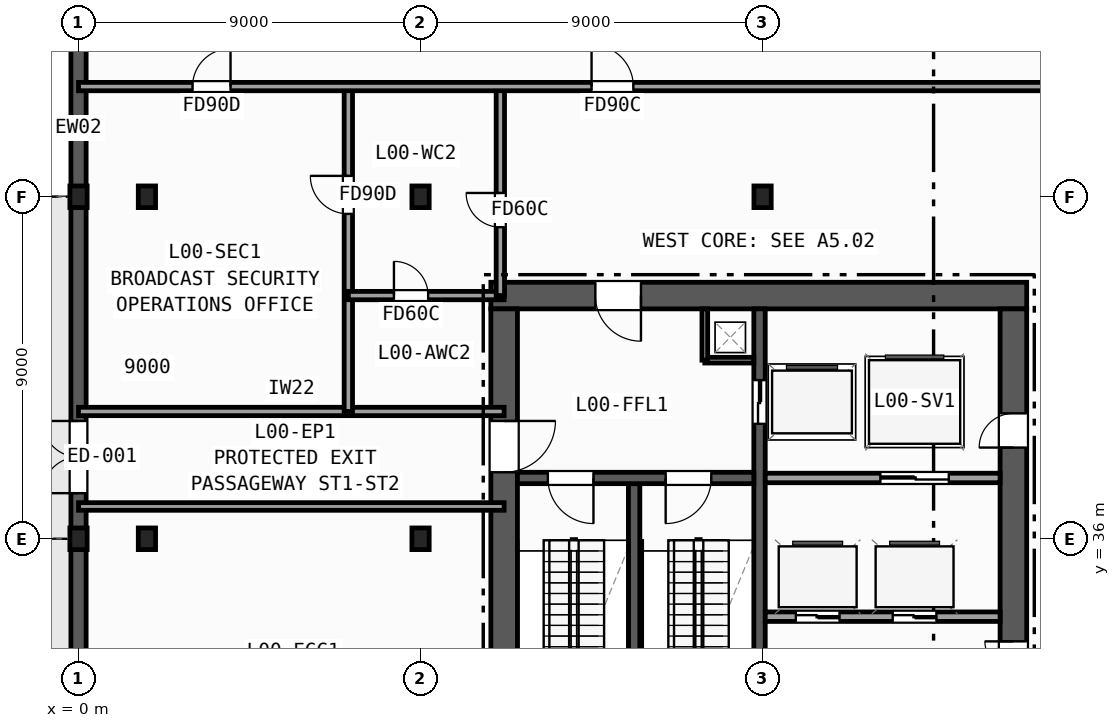
"""IFC4 building model, lengths in metres.
Left out: names, types, materials, properties, quantities, classifications, styles, units other than length and angle.
Written with IfcOpenShell. Run it as: python <this file> out.ifc"""

import sys

from ifc_helpers import new_model, si_unit, direction, frame, frame_2d, origin, origin_2d, place, context, subcontext, project, spatial, rectangle, i_section, extrude, element, fill, save


model = new_model("IFC4")
c1 = context("Model", 3, precision=1e-05, world=origin(), true_north=direction((0.0, 1.0)))
c2 = subcontext(c1, "Body", "Model", "MODEL_VIEW")
j1 = project(units=[si_unit("LENGTHUNIT", "METRE"), si_unit("PLANEANGLEUNIT", "RADIAN")], contexts=[c1])
p1 = place(None, origin())
s1 = spatial("IfcSite", under=j1, at=p1, CompositionType="ELEMENT")
p2 = place(p1, origin())
s2 = spatial("IfcBuilding", under=s1, at=p2, CompositionType="ELEMENT")
p3 = place(p2, origin())
s3 = spatial("IfcBuildingStorey", under=s2, at=p3, CompositionType="ELEMENT", Elevation=0.0)
for number, where, z_axis, x_axis in (
    (1, (0.0, 36.0, 0.0), (0.0, 0.0, 1.0), (1.0, 0.0, 0.0)),
    (2, (0.0, 45.0, 0.0), (0.0, 0.0, 1.0), (1.0, 0.0, 0.0)),
    (3, (9.0, 36.0, 0.0), (0.0, 0.0, 1.0), (1.0, 0.0, 0.0)),
    (4, (9.0, 45.0, 0.0), (0.0, 0.0, 1.0), (1.0, 0.0, 0.0)),
    (5, (18.0, 45.0, 0.0), (0.0, 0.0, 1.0), (1.0, 0.0, 0.0)),
    (6, (1.8, 36.0, 0.0), (0.0, 0.0, 1.0), (1.0, 0.0, 0.0)),
    (7, (1.8, 45.0, 0.0), (0.0, 0.0, 1.0), (1.0, 0.0, 0.0)),
):
    element("IfcColumn", number, at=place(p3, frame(where, z_axis=z_axis, x_axis=x_axis)), inside=s3, PredefinedType="COLUMN", context=c2, shape_type="SweptSolid", body=[
        extrude(i_section(OverallWidth=0.454, OverallDepth=0.569, WebThickness=0.078, FlangeThickness=0.125, FilletRadius=0.015, at=origin_2d()), origin(), (0.0, 0.0, 1.0), 5.8),
    ])
p4 = place(p3, frame((0.0, -0.2, 0.0), z_axis=(0.0, 0.0, 1.0), x_axis=(0.0, 1.0, 0.0)))
e8 = element("IfcWall", 8, at=p4, inside=s3, PredefinedType="SOLIDWALL", context=c2, shape_type="SweptSolid", body=[
    extrude(rectangle(XDim=54.4, YDim=0.4, at=frame_2d((27.2, 0.0))), origin(), (0.0, 0.0, 1.0), 5.48),
])
p5 = place(p4, frame((37.4, 0.0, 0.0)))
e9 = element("IfcOpeningElement", 9, at=p5, cuts=e8, PredefinedType="OPENING", context=c2, shape_type="SweptSolid", body=[
    extrude(rectangle(XDim=1.9, YDim=2.2, at=frame_2d((0.95, 1.1))), frame((0.0, 0.21, 0.0), z_axis=(0.0, -1.0, 0.0), x_axis=(1.0, 0.0, 0.0)), (0.0, 0.0, 1.0), 0.42),
])
p6 = place(p4, frame((19.4, 0.0, 0.0)))
e10 = element("IfcOpeningElement", 10, at=p6, cuts=e8, PredefinedType="OPENING", context=c2, shape_type="SweptSolid", body=[
    extrude(rectangle(XDim=1.6, YDim=2.2, at=frame_2d((0.8, 1.1))), frame((0.0, 0.21, 0.0), z_axis=(0.0, -1.0, 0.0), x_axis=(1.0, 0.0, 0.0)), (0.0, 0.0, 1.0), 0.42),
])
p7 = place(p4, frame((3.6, 0.0, 0.0)))
e11 = element("IfcOpeningElement", 11, at=p7, cuts=e8, PredefinedType="OPENING", context=c2, shape_type="SweptSolid", body=[
    extrude(rectangle(XDim=2.1, YDim=2.4, at=frame_2d((1.05, 1.2))), frame((0.0, 0.21, 0.0), z_axis=(0.0, -1.0, 0.0), x_axis=(1.0, 0.0, 0.0)), (0.0, 0.0, 1.0), 0.42),
])
p8 = place(p4, frame((12.6, 0.0, 0.0)))
e12 = element("IfcOpeningElement", 12, at=p8, cuts=e8, PredefinedType="OPENING", context=c2, shape_type="SweptSolid", body=[
    extrude(rectangle(XDim=2.1, YDim=2.4, at=frame_2d((1.05, 1.2))), frame((0.0, 0.21, 0.0), z_axis=(0.0, -1.0, 0.0), x_axis=(1.0, 0.0, 0.0)), (0.0, 0.0, 1.0), 0.42),
])
p9 = place(p4, frame((21.6, 0.0, 0.0)))
e13 = element("IfcOpeningElement", 13, at=p9, cuts=e8, PredefinedType="OPENING", context=c2, shape_type="SweptSolid", body=[
    extrude(rectangle(XDim=2.1, YDim=2.4, at=frame_2d((1.05, 1.2))), frame((0.0, 0.21, 0.0), z_axis=(0.0, -1.0, 0.0), x_axis=(1.0, 0.0, 0.0)), (0.0, 0.0, 1.0), 0.42),
])
p10 = place(p4, frame((31.4, 0.0, 0.0)))
e14 = element("IfcOpeningElement", 14, at=p10, cuts=e8, PredefinedType="OPENING", context=c2, shape_type="SweptSolid", body=[
    extrude(rectangle(XDim=1.6, YDim=2.2, at=frame_2d((0.8, 1.1))), frame((0.0, 0.21, 0.0), z_axis=(0.0, -1.0, 0.0), x_axis=(1.0, 0.0, 0.0)), (0.0, 0.0, 1.0), 0.42),
])
p11 = place(p3, frame((24.95, 42.4, 0.0), z_axis=(0.0, 0.0, 1.0), x_axis=(-1.0, 0.0, 0.0)))
e15 = element("IfcWall", 15, at=p11, inside=s3, PredefinedType="SHEAR", context=c2, shape_type="SweptSolid", body=[
    extrude(rectangle(XDim=14.1, YDim=0.7, at=frame_2d((7.05, 0.0))), origin(), (0.0, 0.0, 1.0), 5.48),
])
p12 = place(p11, frame((10.15, 0.0, 0.0)))
e16 = element("IfcOpeningElement", 16, at=p12, cuts=e15, PredefinedType="OPENING", context=c2, shape_type="SweptSolid", body=[
    extrude(rectangle(XDim=1.2, YDim=2.15, at=frame_2d((0.6, 1.075))), frame((0.0, 0.36, 0.0), z_axis=(0.0, -1.0, 0.0), x_axis=(1.0, 0.0, 0.0)), (0.0, 0.0, 1.0), 0.72),
])
p13 = place(p3, frame((11.2, 42.05, 0.0), z_axis=(0.0, 0.0, 1.0), x_axis=(0.0, -1.0, 0.0)))
e17 = element("IfcWall", 17, at=p13, inside=s3, PredefinedType="SHEAR", context=c2, shape_type="SweptSolid", body=[
    extrude(rectangle(XDim=13.5, YDim=0.7, at=frame_2d((6.75, 0.0))), origin(), (0.0, 0.0, 1.0), 5.48),
])
p14 = place(p13, frame((2.95, 0.0, 0.0)))
e18 = element("IfcOpeningElement", 18, at=p14, cuts=e17, PredefinedType="OPENING", context=c2, shape_type="SweptSolid", body=[
    extrude(rectangle(XDim=1.35, YDim=2.15, at=frame_2d((0.675, 1.075))), frame((0.0, 0.36, 0.0), z_axis=(0.0, -1.0, 0.0), x_axis=(1.0, 0.0, 0.0)), (0.0, 0.0, 1.0), 0.72),
])
p15 = place(p3, frame((24.6, 28.55, 0.0), z_axis=(0.0, 0.0, 1.0), x_axis=(0.0, 1.0, 0.0)))
e19 = element("IfcWall", 19, at=p15, inside=s3, PredefinedType="SHEAR", context=c2, shape_type="SweptSolid", body=[
    extrude(rectangle(XDim=13.5, YDim=0.7, at=frame_2d((6.75, 0.0))), origin(), (0.0, 0.0, 1.0), 5.48),
])
p16 = place(p15, frame((3.25, 0.0, 0.0)))
e20 = element("IfcOpeningElement", 20, at=p16, cuts=e19, PredefinedType="OPENING", context=c2, shape_type="SweptSolid", body=[
    extrude(rectangle(XDim=1.5, YDim=2.2, at=frame_2d((0.75, 1.1))), frame((0.0, 0.36, 0.0), z_axis=(0.0, -1.0, 0.0), x_axis=(1.0, 0.0, 0.0)), (0.0, 0.0, 1.0), 0.72),
])
p17 = place(p15, frame((9.85, 0.0, 0.0)))
e21 = element("IfcOpeningElement", 21, at=p17, cuts=e19, PredefinedType="OPENING", context=c2, shape_type="SweptSolid", body=[
    extrude(rectangle(XDim=0.9, YDim=2.1, at=frame_2d((0.45, 1.05))), frame((0.0, 0.36, 0.0), z_axis=(0.0, -1.0, 0.0), x_axis=(1.0, 0.0, 0.0)), (0.0, 0.0, 1.0), 0.72),
])
p18 = place(p3, frame((14.62, 28.55, 0.0), z_axis=(0.0, 0.0, 1.0), x_axis=(0.0, 1.0, 0.0)))
e22 = element("IfcWall", 22, at=p18, inside=s3, PredefinedType="SHEAR", context=c2, shape_type="SweptSolid", body=[
    extrude(rectangle(XDim=8.9, YDim=0.3, at=frame_2d((4.45, 0.0))), origin(), (0.0, 0.0, 1.0), 5.48),
])
p19 = place(p3, frame((17.92, 42.05, 0.0), z_axis=(0.0, 0.0, 1.0), x_axis=(0.0, -1.0, 0.0)))
e23 = element("IfcWall", 23, at=p19, inside=s3, PredefinedType="SHEAR", context=c2, shape_type="SweptSolid", body=[
    extrude(rectangle(XDim=13.5, YDim=0.3, at=frame_2d((6.75, 0.0))), origin(), (0.0, 0.0, 1.0), 5.48),
])
p20 = place(p19, frame((1.875, 0.0, 0.0)))
e24 = element("IfcOpeningElement", 24, at=p20, cuts=e23, PredefinedType="OPENING", context=c2, shape_type="SweptSolid", body=[
    extrude(rectangle(XDim=1.15, YDim=2.15, at=frame_2d((0.575, 1.075))), frame((0.0, 0.16, 0.0), z_axis=(0.0, -1.0, 0.0), x_axis=(1.0, 0.0, 0.0)), (0.0, 0.0, 1.0), 0.32),
])
p21 = place(p3, frame((17.77, 37.6, 0.0), z_axis=(0.0, 0.0, 1.0), x_axis=(-1.0, 0.0, 0.0)))
e25 = element("IfcWall", 25, at=p21, inside=s3, PredefinedType="SHEAR", context=c2, shape_type="SweptSolid", body=[
    extrude(rectangle(XDim=6.22, YDim=0.3, at=frame_2d((3.11, 0.0))), origin(), (0.0, 0.0, 1.0), 5.48),
])
p22 = place(p21, frame((4.22, 0.0, 0.0)))
e26 = element("IfcOpeningElement", 26, at=p22, cuts=e25, PredefinedType="OPENING", context=c2, shape_type="SweptSolid", body=[
    extrude(rectangle(XDim=1.2, YDim=2.15, at=frame_2d((0.6, 1.075))), frame((0.0, 0.16, 0.0), z_axis=(0.0, -1.0, 0.0), x_axis=(1.0, 0.0, 0.0)), (0.0, 0.0, 1.0), 0.32),
])
p23 = place(p21, frame((1.12, 0.0, 0.0)))
e27 = element("IfcOpeningElement", 27, at=p23, cuts=e25, PredefinedType="OPENING", context=c2, shape_type="SweptSolid", body=[
    extrude(rectangle(XDim=1.2, YDim=2.15, at=frame_2d((0.6, 1.075))), frame((0.0, 0.16, 0.0), z_axis=(0.0, -1.0, 0.0), x_axis=(1.0, 0.0, 0.0)), (0.0, 0.0, 1.0), 0.32),
])
p24 = place(p3, frame((16.48, 40.7, 0.0), z_axis=(0.0, 0.0, 1.0), x_axis=(1.0, 0.0, 0.0)))
e28 = element("IfcWall", 28, at=p24, inside=s3, PredefinedType="PARTITIONING", context=c2, shape_type="SweptSolid", body=[
    extrude(rectangle(XDim=1.29, YDim=0.15, at=frame_2d((0.645, 0.0))), origin(), (0.0, 0.0, 1.0), 5.48),
])
p25 = place(p3, frame((16.48, 40.7, 0.0), z_axis=(0.0, 0.0, 1.0), x_axis=(0.0, 1.0, 0.0)))
e29 = element("IfcWall", 29, at=p25, inside=s3, PredefinedType="PARTITIONING", context=c2, shape_type="SweptSolid", body=[
    extrude(rectangle(XDim=1.35, YDim=0.15, at=frame_2d((0.675, 0.0))), origin(), (0.0, 0.0, 1.0), 5.48),
])
p26 = place(p3, frame((18.07, 37.6, 0.0), z_axis=(0.0, 0.0, 1.0), x_axis=(1.0, 0.0, 0.0)))
e30 = element("IfcWall", 30, at=p26, inside=s3, PredefinedType="PARTITIONING", context=c2, shape_type="SweptSolid", body=[
    extrude(rectangle(XDim=6.18, YDim=0.25, at=frame_2d((3.09, 0.0))), origin(), (0.0, 0.0, 1.0), 5.48),
])
p27 = place(p26, frame((3.03, 0.0, 0.0)))
e31 = element("IfcOpeningElement", 31, at=p27, cuts=e30, PredefinedType="OPENING", context=c2, shape_type="SweptSolid", body=[
    extrude(rectangle(XDim=1.8, YDim=2.3, at=frame_2d((0.9, 1.15))), frame((0.0, 0.135, 0.0), z_axis=(0.0, -1.0, 0.0), x_axis=(1.0, 0.0, 0.0)), (0.0, 0.0, 1.0), 0.27),
])
p28 = place(p3, frame((24.25, 33.95, 0.0), z_axis=(0.0, 0.0, 1.0), x_axis=(-1.0, 0.0, 0.0)))
e32 = element("IfcWall", 32, at=p28, inside=s3, PredefinedType="PARTITIONING", context=c2, shape_type="SweptSolid", body=[
    extrude(rectangle(XDim=6.18, YDim=0.25, at=frame_2d((3.09, 0.0))), origin(), (0.0, 0.0, 1.0), 5.48),
])
p29 = place(p28, frame((4.225, 0.0, 0.0)))
e33 = element("IfcOpeningElement", 33, at=p29, cuts=e32, PredefinedType="OPENING", context=c2, shape_type="SweptSolid", body=[
    extrude(rectangle(XDim=1.15, YDim=2.15, at=frame_2d((0.575, 1.075))), frame((0.0, 0.135, 0.0), z_axis=(0.0, -1.0, 0.0), x_axis=(1.0, 0.0, 0.0)), (0.0, 0.0, 1.0), 0.27),
])
p30 = place(p28, frame((1.675, 0.0, 0.0)))
e34 = element("IfcOpeningElement", 34, at=p30, cuts=e32, PredefinedType="OPENING", context=c2, shape_type="SweptSolid", body=[
    extrude(rectangle(XDim=1.15, YDim=2.15, at=frame_2d((0.575, 1.075))), frame((0.0, 0.135, 0.0), z_axis=(0.0, -1.0, 0.0), x_axis=(1.0, 0.0, 0.0)), (0.0, 0.0, 1.0), 0.27),
])
p31 = place(p3, frame((0.0, 36.85, 0.0), z_axis=(0.0, 0.0, 1.0), x_axis=(1.0, 0.0, 0.0)))
e35 = element("IfcWall", 35, at=p31, inside=s3, PredefinedType="PARTITIONING", context=c2, shape_type="SweptSolid", body=[
    extrude(rectangle(XDim=11.2, YDim=0.2, at=frame_2d((5.6, 0.0))), origin(), (0.0, 0.0, 1.0), 4.605),
])
p32 = place(p3, frame((0.0, 39.35, 0.0), z_axis=(0.0, 0.0, 1.0), x_axis=(1.0, 0.0, 0.0)))
e36 = element("IfcWall", 36, at=p32, inside=s3, PredefinedType="PARTITIONING", context=c2, shape_type="SweptSolid", body=[
    extrude(rectangle(XDim=11.2, YDim=0.22, at=frame_2d((5.6, 0.0))), origin(), (0.0, 0.0, 1.0), 4.605),
])
p33 = place(p3, frame((7.1, 39.35, 0.0), z_axis=(0.0, 0.0, 1.0), x_axis=(0.0, 1.0, 0.0)))
e37 = element("IfcWall", 37, at=p33, inside=s3, PredefinedType="PARTITIONING", context=c2, shape_type="SweptSolid", body=[
    extrude(rectangle(XDim=8.55, YDim=0.22, at=frame_2d((4.275, 0.0))), origin(), (0.0, 0.0, 1.0), 4.533),
])
p34 = place(p33, frame((5.2, 0.0, 0.0)))
e38 = element("IfcOpeningElement", 38, at=p34, cuts=e37, PredefinedType="OPENING", context=c2, shape_type="SweptSolid", body=[
    extrude(rectangle(XDim=1.0, YDim=2.15, at=frame_2d((0.5, 1.075))), frame((0.0, 0.12, 0.0), z_axis=(0.0, -1.0, 0.0), x_axis=(1.0, 0.0, 0.0)), (0.0, 0.0, 1.0), 0.24),
])
p35 = place(p3, frame((7.1, 42.4, 0.0), z_axis=(0.0, 0.0, 1.0), x_axis=(1.0, 0.0, 0.0)))
e39 = element("IfcWall", 39, at=p35, inside=s3, PredefinedType="PARTITIONING", context=c2, shape_type="SweptSolid", body=[
    extrude(rectangle(XDim=4.1, YDim=0.22, at=frame_2d((2.05, 0.0))), origin(), (0.0, 0.0, 1.0), 4.605),
])
p36 = place(p35, frame((1.2, 0.0, 0.0)))
e40 = element("IfcOpeningElement", 40, at=p36, cuts=e39, PredefinedType="OPENING", context=c2, shape_type="SweptSolid", body=[
    extrude(rectangle(XDim=0.9, YDim=2.1, at=frame_2d((0.45, 1.05))), frame((0.0, 0.12, 0.0), z_axis=(0.0, -1.0, 0.0), x_axis=(1.0, 0.0, 0.0)), (0.0, 0.0, 1.0), 0.24),
])
p37 = place(p3, frame((11.1, 42.4, 0.0), z_axis=(0.0, 0.0, 1.0), x_axis=(0.0, 1.0, 0.0)))
e41 = element("IfcWall", 41, at=p37, inside=s3, PredefinedType="PARTITIONING", context=c2, shape_type="SweptSolid", body=[
    extrude(rectangle(XDim=5.5, YDim=0.22, at=frame_2d((2.75, 0.0))), origin(), (0.0, 0.0, 1.0), 4.533),
])
p38 = place(p37, frame((1.8, 0.0, 0.0)))
e42 = element("IfcOpeningElement", 42, at=p38, cuts=e41, PredefinedType="OPENING", context=c2, shape_type="SweptSolid", body=[
    extrude(rectangle(XDim=0.9, YDim=2.1, at=frame_2d((0.45, 1.05))), frame((0.0, 0.12, 0.0), z_axis=(0.0, -1.0, 0.0), x_axis=(1.0, 0.0, 0.0)), (0.0, 0.0, 1.0), 0.24),
])
p39 = place(p3, frame((0.0, 47.9, 0.0), z_axis=(0.0, 0.0, 1.0), x_axis=(1.0, 0.0, 0.0)))
e43 = element("IfcWall", 43, at=p39, inside=s3, PredefinedType="PARTITIONING", context=c2, shape_type="SweptSolid", body=[
    extrude(rectangle(XDim=27.1, YDim=0.22, at=frame_2d((13.55, 0.0))), origin(), (0.0, 0.0, 1.0), 4.605),
])
p40 = place(p39, frame((13.5, 0.0, 0.0)))
e44 = element("IfcOpeningElement", 44, at=p40, cuts=e43, PredefinedType="OPENING", context=c2, shape_type="SweptSolid", body=[
    extrude(rectangle(XDim=1.1, YDim=2.15, at=frame_2d((0.55, 1.075))), frame((0.0, 0.12, 0.0), z_axis=(0.0, -1.0, 0.0), x_axis=(1.0, 0.0, 0.0)), (0.0, 0.0, 1.0), 0.24),
])
p41 = place(p39, frame((3.0, 0.0, 0.0)))
e45 = element("IfcOpeningElement", 45, at=p41, cuts=e43, PredefinedType="OPENING", context=c2, shape_type="SweptSolid", body=[
    extrude(rectangle(XDim=1.0, YDim=2.15, at=frame_2d((0.5, 1.075))), frame((0.0, 0.12, 0.0), z_axis=(0.0, -1.0, 0.0), x_axis=(1.0, 0.0, 0.0)), (0.0, 0.0, 1.0), 0.24),
])
p42 = place(p5, origin())
e46 = element("IfcDoor", 46, at=p42, inside=s3, OperationType="DOUBLE_DOOR_SINGLE_SWING", PredefinedType="DOOR", context=c2, shape_type="SweptSolid", body=[
    extrude(rectangle(XDim=1.9, YDim=2.2, at=frame_2d((0.95, 1.1))), frame((0.0, 0.025, 0.0), z_axis=(0.0, -1.0, 0.0), x_axis=(1.0, 0.0, 0.0)), (0.0, 0.0, 1.0), 0.05),
])
fill(e9, e46)
p43 = place(p14, origin())
e47 = element("IfcDoor", 47, at=p43, inside=s3, OperationType="SINGLE_SWING_LEFT", PredefinedType="DOOR", context=c2, shape_type="SweptSolid", body=[
    extrude(rectangle(XDim=1.35, YDim=2.15, at=frame_2d((0.675, 1.075))), frame((0.0, 0.025, 0.0), z_axis=(0.0, -1.0, 0.0), x_axis=(1.0, 0.0, 0.0)), (0.0, 0.0, 1.0), 0.05),
])
fill(e18, e47)
p44 = place(p22, origin())
e48 = element("IfcDoor", 48, at=p44, inside=s3, OperationType="SINGLE_SWING_LEFT", PredefinedType="DOOR", context=c2, shape_type="SweptSolid", body=[
    extrude(rectangle(XDim=1.2, YDim=2.15, at=frame_2d((0.6, 1.075))), frame((0.0, 0.025, 0.0), z_axis=(0.0, -1.0, 0.0), x_axis=(1.0, 0.0, 0.0)), (0.0, 0.0, 1.0), 0.05),
])
fill(e26, e48)
p45 = place(p23, origin())
e49 = element("IfcDoor", 49, at=p45, inside=s3, OperationType="SINGLE_SWING_RIGHT", PredefinedType="DOOR", context=c2, shape_type="SweptSolid", body=[
    extrude(rectangle(XDim=1.2, YDim=2.15, at=frame_2d((0.6, 1.075))), frame((0.0, 0.025, 0.0), z_axis=(0.0, -1.0, 0.0), x_axis=(1.0, 0.0, 0.0)), (0.0, 0.0, 1.0), 0.05),
])
fill(e27, e49)
p46 = place(p16, origin())
e50 = element("IfcDoor", 50, at=p46, inside=s3, OperationType="DOUBLE_DOOR_SINGLE_SWING", PredefinedType="DOOR", context=c2, shape_type="SweptSolid", body=[
    extrude(rectangle(XDim=1.5, YDim=2.2, at=frame_2d((0.75, 1.1))), frame((0.0, 0.025, 0.0), z_axis=(0.0, -1.0, 0.0), x_axis=(1.0, 0.0, 0.0)), (0.0, 0.0, 1.0), 0.05),
])
fill(e20, e50)
p47 = place(p12, origin())
e51 = element("IfcDoor", 51, at=p47, inside=s3, OperationType="SINGLE_SWING_LEFT", PredefinedType="DOOR", context=c2, shape_type="SweptSolid", body=[
    extrude(rectangle(XDim=1.2, YDim=2.15, at=frame_2d((0.6, 1.075))), frame((0.0, 0.025, 0.0), z_axis=(0.0, -1.0, 0.0), x_axis=(1.0, 0.0, 0.0)), (0.0, 0.0, 1.0), 0.05),
])
fill(e16, e51)
p48 = place(p17, origin())
e52 = element("IfcDoor", 52, at=p48, inside=s3, OperationType="SINGLE_SWING_LEFT", PredefinedType="DOOR", context=c2, shape_type="SweptSolid", body=[
    extrude(rectangle(XDim=0.9, YDim=2.1, at=frame_2d((0.45, 1.05))), frame((0.0, 0.025, 0.0), z_axis=(0.0, -1.0, 0.0), x_axis=(1.0, 0.0, 0.0)), (0.0, 0.0, 1.0), 0.05),
])
fill(e21, e52)
p49 = place(p20, origin())
e53 = element("IfcDoor", 53, at=p49, inside=s3, OperationType="DOUBLE_DOOR_SLIDING", PredefinedType="DOOR", context=c2, shape_type="SweptSolid", body=[
    extrude(rectangle(XDim=1.15, YDim=2.15, at=frame_2d((0.575, 1.075))), frame((0.0, 0.025, 0.0), z_axis=(0.0, -1.0, 0.0), x_axis=(1.0, 0.0, 0.0)), (0.0, 0.0, 1.0), 0.05),
])
fill(e24, e53)
p50 = place(p27, origin())
e54 = element("IfcDoor", 54, at=p50, inside=s3, OperationType="DOUBLE_DOOR_SLIDING", PredefinedType="DOOR", context=c2, shape_type="SweptSolid", body=[
    extrude(rectangle(XDim=1.8, YDim=2.3, at=frame_2d((0.9, 1.15))), frame((0.0, 0.025, 0.0), z_axis=(0.0, -1.0, 0.0), x_axis=(1.0, 0.0, 0.0)), (0.0, 0.0, 1.0), 0.05),
])
fill(e31, e54)
p51 = place(p29, origin())
e55 = element("IfcDoor", 55, at=p51, inside=s3, OperationType="DOUBLE_DOOR_SLIDING", PredefinedType="DOOR", context=c2, shape_type="SweptSolid", body=[
    extrude(rectangle(XDim=1.15, YDim=2.15, at=frame_2d((0.575, 1.075))), frame((0.0, 0.025, 0.0), z_axis=(0.0, -1.0, 0.0), x_axis=(1.0, 0.0, 0.0)), (0.0, 0.0, 1.0), 0.05),
])
fill(e33, e55)
p52 = place(p30, origin())
e56 = element("IfcDoor", 56, at=p52, inside=s3, OperationType="DOUBLE_DOOR_SLIDING", PredefinedType="DOOR", context=c2, shape_type="SweptSolid", body=[
    extrude(rectangle(XDim=1.15, YDim=2.15, at=frame_2d((0.575, 1.075))), frame((0.0, 0.025, 0.0), z_axis=(0.0, -1.0, 0.0), x_axis=(1.0, 0.0, 0.0)), (0.0, 0.0, 1.0), 0.05),
])
fill(e34, e56)
p53 = place(p34, origin())
e57 = element("IfcDoor", 57, at=p53, inside=s3, OperationType="SINGLE_SWING_RIGHT", PredefinedType="DOOR", context=c2, shape_type="SweptSolid", body=[
    extrude(rectangle(XDim=1.0, YDim=2.15, at=frame_2d((0.5, 1.075))), frame((0.0, 0.025, 0.0), z_axis=(0.0, -1.0, 0.0), x_axis=(1.0, 0.0, 0.0)), (0.0, 0.0, 1.0), 0.05),
])
fill(e38, e57)
p54 = place(p36, origin())
e58 = element("IfcDoor", 58, at=p54, inside=s3, OperationType="SINGLE_SWING_LEFT", PredefinedType="DOOR", context=c2, shape_type="SweptSolid", body=[
    extrude(rectangle(XDim=0.9, YDim=2.1, at=frame_2d((0.45, 1.05))), frame((0.0, 0.025, 0.0), z_axis=(0.0, -1.0, 0.0), x_axis=(1.0, 0.0, 0.0)), (0.0, 0.0, 1.0), 0.05),
])
fill(e40, e58)
p55 = place(p38, origin())
e59 = element("IfcDoor", 59, at=p55, inside=s3, OperationType="SINGLE_SWING_RIGHT", PredefinedType="DOOR", context=c2, shape_type="SweptSolid", body=[
    extrude(rectangle(XDim=0.9, YDim=2.1, at=frame_2d((0.45, 1.05))), frame((0.0, 0.025, 0.0), z_axis=(0.0, -1.0, 0.0), x_axis=(1.0, 0.0, 0.0)), (0.0, 0.0, 1.0), 0.05),
])
fill(e42, e59)
p56 = place(p40, origin())
e60 = element("IfcDoor", 60, at=p56, inside=s3, OperationType="SINGLE_SWING_LEFT", PredefinedType="DOOR", context=c2, shape_type="SweptSolid", body=[
    extrude(rectangle(XDim=1.1, YDim=2.15, at=frame_2d((0.55, 1.075))), frame((0.0, 0.025, 0.0), z_axis=(0.0, -1.0, 0.0), x_axis=(1.0, 0.0, 0.0)), (0.0, 0.0, 1.0), 0.05),
])
fill(e44, e60)
p57 = place(p41, origin())
e61 = element("IfcDoor", 61, at=p57, inside=s3, OperationType="SINGLE_SWING_RIGHT", PredefinedType="DOOR", context=c2, shape_type="SweptSolid", body=[
    extrude(rectangle(XDim=1.0, YDim=2.15, at=frame_2d((0.5, 1.075))), frame((0.0, 0.025, 0.0), z_axis=(0.0, -1.0, 0.0), x_axis=(1.0, 0.0, 0.0)), (0.0, 0.0, 1.0), 0.05),
])
fill(e45, e61)
save(model, sys.argv[1])
